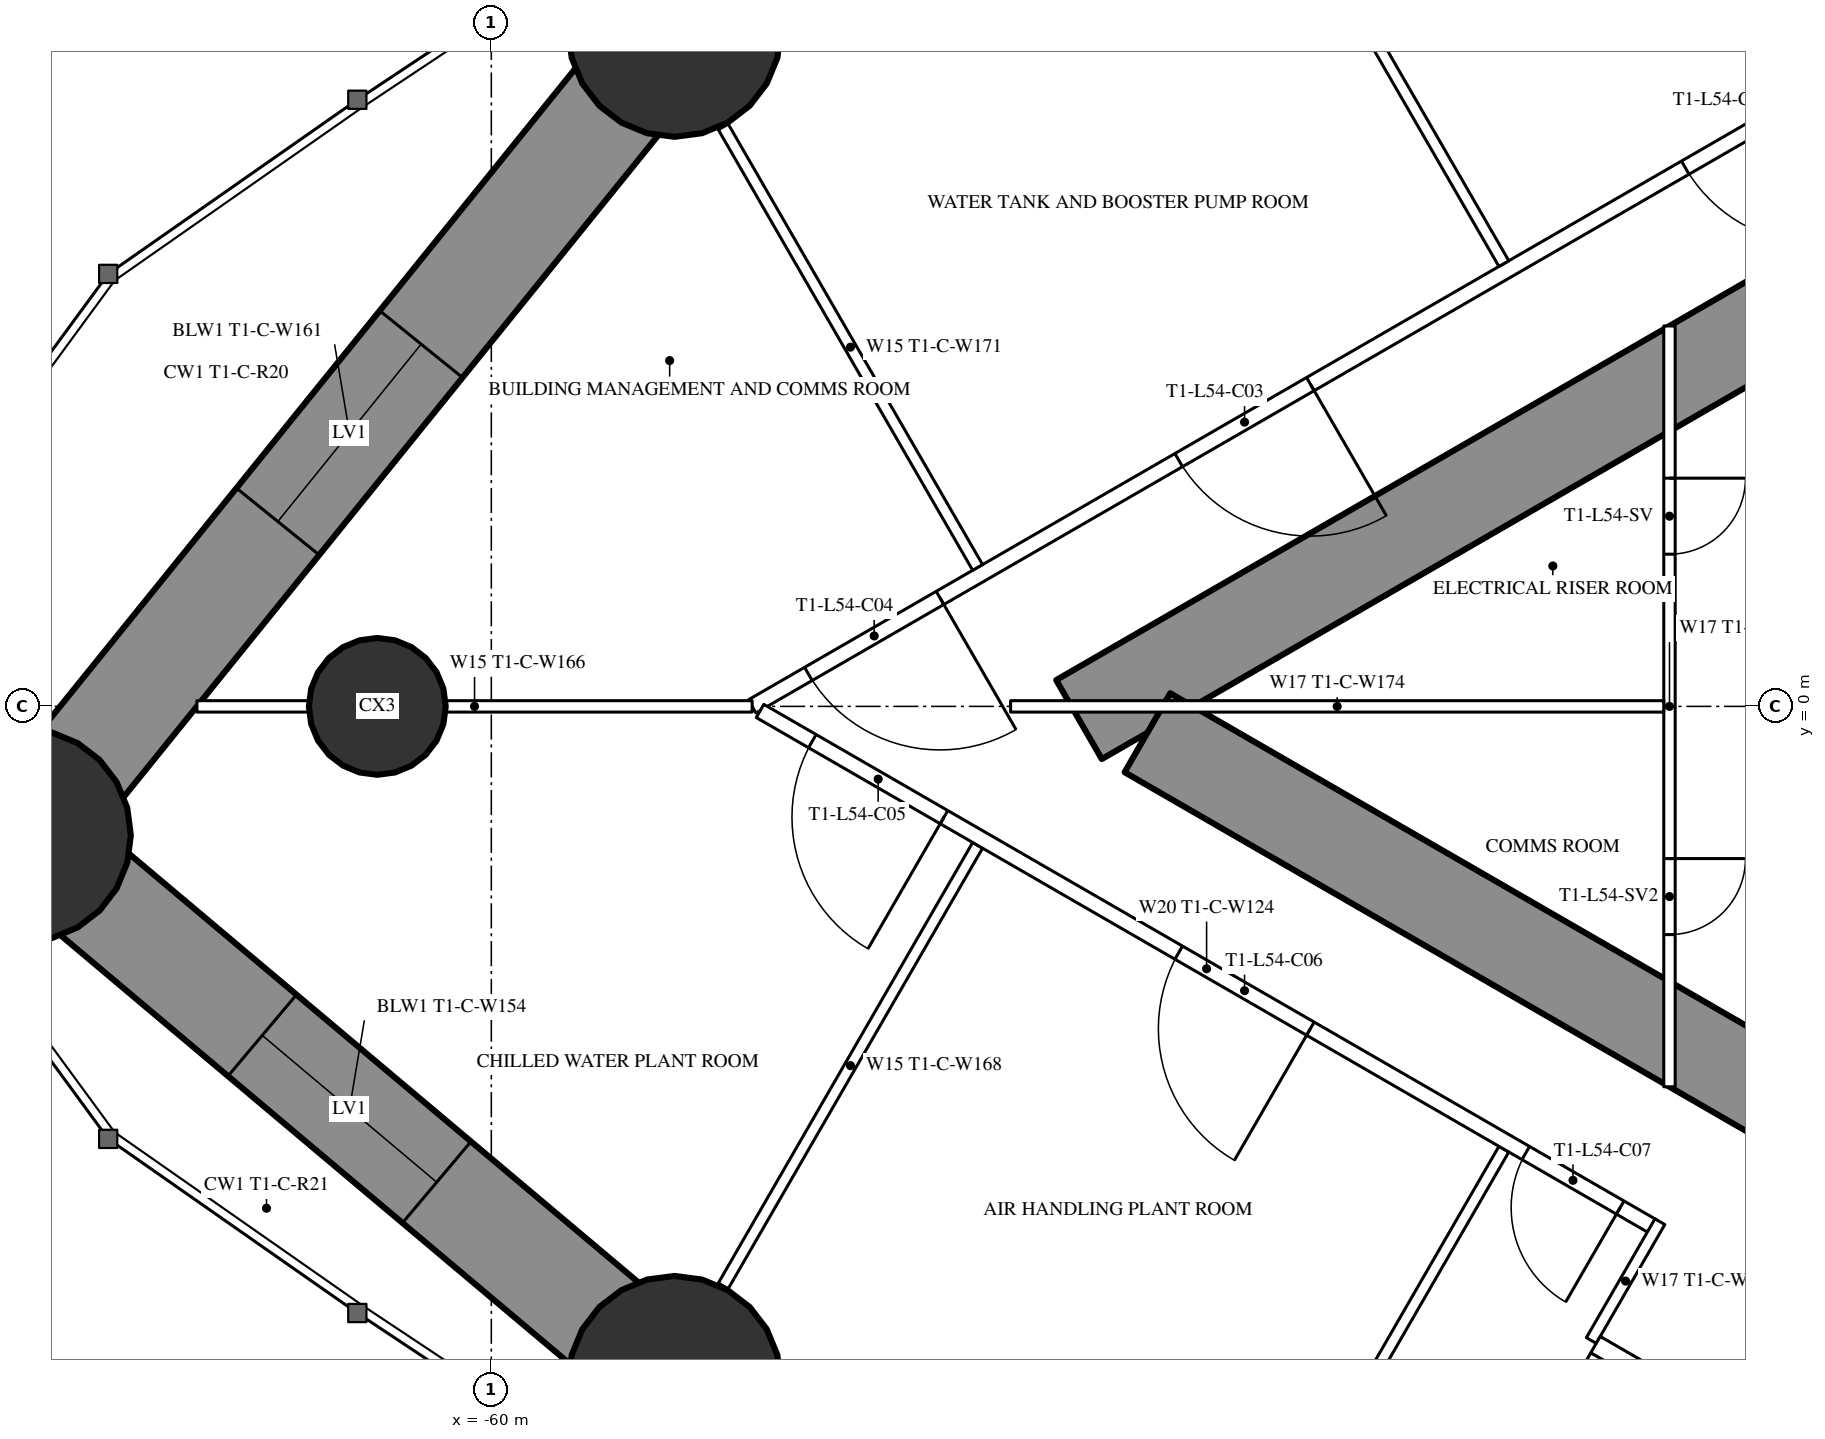
"""IFC4 building model, lengths in metres.
Left out: names, types, materials, properties, quantities, classifications, styles, units other than length and angle.
Written with IfcOpenShell. Run it as: python <this file> out.ifc"""

import sys

from ifc_helpers import new_model, si_unit, direction, frame, frame_2d, origin, origin_2d, place, context, subcontext, project, spatial, rectangle, circle, extrude, element, fill, save


model = new_model("IFC4")
c1 = context("Model", 3, precision=1e-05, world=origin(), true_north=direction((0.0, 1.0)))
c2 = subcontext(c1, "Body", "Model", "MODEL_VIEW")
j1 = project(units=[si_unit("LENGTHUNIT", "METRE"), si_unit("PLANEANGLEUNIT", "RADIAN")], contexts=[c1])
p1 = place(None, origin())
s1 = spatial("IfcSite", under=j1, at=p1, CompositionType="ELEMENT")
p2 = place(p1, origin())
s2 = spatial("IfcBuilding", under=s1, at=p2, CompositionType="ELEMENT")
p3 = place(p2, frame((0.0, 0.0, 201.8)))
s3 = spatial("IfcBuildingStorey", under=s2, at=p3, CompositionType="ELEMENT", Elevation=201.8)
for number, where, z_axis, x_axis in (
    (1, (-66.143, -1.695, 0.0), (0.0, 0.0, 1.0), (1.0, 0.0, 0.0)),
    (2, (-57.59, -8.893, 0.0), (0.0, 0.0, 1.0), (1.0, 0.0, 0.0)),
    (3, (-57.59, 8.893, 0.0), (0.0, 0.0, 1.0), (1.0, 0.0, 0.0)),
):
    element("IfcColumn", number, at=place(p3, frame(where, z_axis=z_axis, x_axis=x_axis)), inside=s3, PredefinedType="COLUMN", context=c2, shape_type="SweptSolid", body=[
        extrude(circle(Radius=1.4, at=origin_2d()), origin(), (0.0, 0.0, 1.0), 3.5),
    ])
p4 = place(p3, frame((-61.5, 0.0, 0.0), z_axis=(0.0, 0.0, 1.0), x_axis=(1.0, 0.0, 0.0)))
e4 = element("IfcColumn", 4, at=p4, inside=s3, PredefinedType="COLUMN", context=c2, shape_type="SweptSolid", body=[
    extrude(circle(Radius=0.9, at=origin_2d()), origin(), (0.0, 0.0, 1.0), 3.5),
])
p5 = place(p3, frame((-27.2, 14.3, 0.0), z_axis=(0.0, 0.0, 1.0), x_axis=(-0.866026593062, -0.499997940104, 0.0)))
e5 = element("IfcWall", 5, at=p5, inside=s3, PredefinedType="SHEAR", context=c2, shape_type="SweptSolid", body=[
    extrude(rectangle(XDim=28.946, YDim=1.2, at=frame_2d((14.473, 0.0))), origin(), (0.0, 0.0, 1.0), 3.5),
])
p6 = place(p5, frame((6.5, 0.0, 0.0)))
e6 = element("IfcOpeningElement", 6, at=p6, cuts=e5, PredefinedType="OPENING", context=c2, shape_type="SweptSolid", body=[
    extrude(rectangle(XDim=1.0, YDim=2.2, at=frame_2d((0.5, 1.1))), frame((0.0, 0.61, 0.0), z_axis=(0.0, -1.0, 0.0), x_axis=(1.0, 0.0, 0.0)), (0.0, 0.0, 1.0), 1.22),
])
p7 = place(p5, frame((13.395, 0.0, 0.0)))
e7 = element("IfcOpeningElement", 7, at=p7, cuts=e5, PredefinedType="OPENING", context=c2, shape_type="SweptSolid", body=[
    extrude(rectangle(XDim=1.8, YDim=2.03, at=frame_2d((0.9, 1.015))), frame((0.0, 0.61, 0.0), z_axis=(0.0, -1.0, 0.0), x_axis=(1.0, 0.0, 0.0)), (0.0, 0.0, 1.0), 1.22),
])
p8 = place(p3, frame((-27.2, -14.3, 0.0), z_axis=(0.0, 0.0, 1.0), x_axis=(-0.866024021859, 0.500002393557, 0.0)))
e8 = element("IfcWall", 8, at=p8, inside=s3, PredefinedType="SHEAR", context=c2, shape_type="SweptSolid", body=[
    extrude(rectangle(XDim=27.907, YDim=1.2, at=frame_2d((13.954, 0.0))), origin(), (0.0, 0.0, 1.0), 3.5),
])
p9 = place(p8, frame((6.5, 0.0, 0.0)))
e9 = element("IfcOpeningElement", 9, at=p9, cuts=e8, PredefinedType="OPENING", context=c2, shape_type="SweptSolid", body=[
    extrude(rectangle(XDim=1.0, YDim=2.2, at=frame_2d((0.5, 1.1))), frame((0.0, 0.61, 0.0), z_axis=(0.0, -1.0, 0.0), x_axis=(1.0, 0.0, 0.0)), (0.0, 0.0, 1.0), 1.22),
])
p10 = place(p8, frame((13.829, 0.0, 0.0)))
e10 = element("IfcOpeningElement", 10, at=p10, cuts=e8, PredefinedType="OPENING", context=c2, shape_type="SweptSolid", body=[
    extrude(rectangle(XDim=1.8, YDim=2.2, at=frame_2d((0.9, 1.1))), frame((0.0, 0.61, 0.0), z_axis=(0.0, -1.0, 0.0), x_axis=(1.0, 0.0, 0.0)), (0.0, 0.0, 1.0), 1.22),
])
p11 = place(p3, frame((-50.839, 13.043, 0.0), z_axis=(0.0, 0.0, 1.0), x_axis=(-0.851892008043, -0.523717487423, 0.0)))
e11 = element("IfcWall", 11, at=p11, inside=s3, PredefinedType="SHEAR", context=c2, shape_type="SweptSolid", body=[
    extrude(rectangle(XDim=7.924, YDim=1.4, at=frame_2d((3.962, 0.0))), origin(), (0.0, 0.0, 1.0), 3.5),
])
p12 = place(p11, frame((2.462, 0.0, 0.6)))
e12 = element("IfcOpeningElement", 12, at=p12, cuts=e11, PredefinedType="OPENING", context=c2, shape_type="SweptSolid", body=[
    extrude(rectangle(XDim=3.0, YDim=1.2, at=frame_2d((1.5, 0.6))), frame((0.0, 0.71, 0.0), z_axis=(0.0, -1.0, 0.0), x_axis=(1.0, 0.0, 0.0)), (0.0, 0.0, 1.0), 1.42),
])
p13 = place(p3, frame((-57.59, 8.893, 0.0), z_axis=(0.0, 0.0, 1.0), x_axis=(-0.628373846765, -0.777911504416, 0.0)))
e13 = element("IfcWall", 13, at=p13, inside=s3, PredefinedType="SHEAR", context=c2, shape_type="SweptSolid", body=[
    extrude(rectangle(XDim=13.611, YDim=1.4, at=frame_2d((6.806, 0.0))), origin(), (0.0, 0.0, 1.0), 3.5),
])
p14 = place(p13, frame((5.306, 0.0, 0.6)))
e14 = element("IfcOpeningElement", 14, at=p14, cuts=e13, PredefinedType="OPENING", context=c2, shape_type="SweptSolid", body=[
    extrude(rectangle(XDim=3.0, YDim=1.2, at=frame_2d((1.5, 0.6))), frame((0.0, 0.71, 0.0), z_axis=(0.0, -1.0, 0.0), x_axis=(1.0, 0.0, 0.0)), (0.0, 0.0, 1.0), 1.42),
])
p15 = place(p3, frame((-66.143, -1.695, 0.0), z_axis=(0.0, 0.0, 1.0), x_axis=(0.765120708367, -0.64388687021, 0.0)))
e15 = element("IfcWall", 15, at=p15, inside=s3, PredefinedType="SHEAR", context=c2, shape_type="SweptSolid", body=[
    extrude(rectangle(XDim=11.179, YDim=1.4, at=frame_2d((5.589, 0.0))), origin(), (0.0, 0.0, 1.0), 3.5),
])
p16 = place(p15, frame((4.089, 0.0, 0.6)))
e16 = element("IfcOpeningElement", 16, at=p16, cuts=e15, PredefinedType="OPENING", context=c2, shape_type="SweptSolid", body=[
    extrude(rectangle(XDim=3.0, YDim=1.2, at=frame_2d((1.5, 0.6))), frame((0.0, 0.71, 0.0), z_axis=(0.0, -1.0, 0.0), x_axis=(1.0, 0.0, 0.0)), (0.0, 0.0, 1.0), 1.42),
])
p17 = place(p3, frame((-57.59, -8.893, 0.0), z_axis=(0.0, 0.0, 1.0), x_axis=(0.851892008043, -0.523717487423, 0.0)))
e17 = element("IfcWall", 17, at=p17, inside=s3, PredefinedType="SHEAR", context=c2, shape_type="SweptSolid", body=[
    extrude(rectangle(XDim=7.924, YDim=1.4, at=frame_2d((3.962, 0.0))), origin(), (0.0, 0.0, 1.0), 3.5),
])
p18 = place(p17, frame((2.462, 0.0, 0.6)))
e18 = element("IfcOpeningElement", 18, at=p18, cuts=e17, PredefinedType="OPENING", context=c2, shape_type="SweptSolid", body=[
    extrude(rectangle(XDim=3.0, YDim=1.2, at=frame_2d((1.5, 0.6))), frame((0.0, 0.71, 0.0), z_axis=(0.0, -1.0, 0.0), x_axis=(1.0, 0.0, 0.0)), (0.0, 0.0, 1.0), 1.42),
])
p19 = place(p3, frame((-27.803, 16.608, 0.0), z_axis=(0.0, 0.0, 1.0), x_axis=(-0.866025851808, -0.499999223999, 0.0)))
e19 = element("IfcWall", 19, at=p19, inside=s3, PredefinedType="PARTITIONING", context=c2, shape_type="SweptSolid", body=[
    extrude(rectangle(XDim=33.215, YDim=0.2, at=frame_2d((16.608, 0.0))), origin(), (0.0, 0.0, 1.0), 3.25),
])
p20 = place(p19, frame((5.584, 0.0, 0.0)))
e20 = element("IfcOpeningElement", 20, at=p20, cuts=e19, PredefinedType="OPENING", context=c2, shape_type="SweptSolid", body=[
    extrude(rectangle(XDim=2.0, YDim=2.4, at=frame_2d((1.0, 1.2))), frame((0.0, 0.11, 0.0), z_axis=(0.0, -1.0, 0.0), x_axis=(1.0, 0.0, 0.0)), (0.0, 0.0, 1.0), 0.22),
])
p21 = place(p19, frame((17.04, 0.0, 0.0)))
e21 = element("IfcOpeningElement", 21, at=p21, cuts=e19, PredefinedType="OPENING", context=c2, shape_type="SweptSolid", body=[
    extrude(rectangle(XDim=2.0, YDim=2.4, at=frame_2d((1.0, 1.2))), frame((0.0, 0.11, 0.0), z_axis=(0.0, -1.0, 0.0), x_axis=(1.0, 0.0, 0.0)), (0.0, 0.0, 1.0), 0.22),
])
p22 = place(p19, frame((24.735, 0.0, 0.0)))
e22 = element("IfcOpeningElement", 22, at=p22, cuts=e19, PredefinedType="OPENING", context=c2, shape_type="SweptSolid", body=[
    extrude(rectangle(XDim=2.0, YDim=2.4, at=frame_2d((1.0, 1.2))), frame((0.0, 0.11, 0.0), z_axis=(0.0, -1.0, 0.0), x_axis=(1.0, 0.0, 0.0)), (0.0, 0.0, 1.0), 0.22),
])
p23 = place(p19, frame((30.361, 0.0, 0.0)))
e23 = element("IfcOpeningElement", 23, at=p23, cuts=e19, PredefinedType="OPENING", context=c2, shape_type="SweptSolid", body=[
    extrude(rectangle(XDim=2.0, YDim=2.03, at=frame_2d((1.0, 1.015))), frame((0.0, 0.11, 0.0), z_axis=(0.0, -1.0, 0.0), x_axis=(1.0, 0.0, 0.0)), (0.0, 0.0, 1.0), 0.22),
])
p24 = place(p3, frame((-46.679, 5.825, 0.0), z_axis=(0.0, 0.0, 1.0), x_axis=(-0.500006839597, 0.866021454905, 0.0)))
e24 = element("IfcWall", 24, at=p24, inside=s3, PredefinedType="PARTITIONING", context=c2, shape_type="SweptSolid", body=[
    extrude(rectangle(XDim=6.911, YDim=0.15, at=frame_2d((3.456, 0.0))), origin(), (0.0, 0.0, 1.0), 2.05),
])
p25 = place(p3, frame((-53.602, 1.828, 0.0), z_axis=(0.0, 0.0, 1.0), x_axis=(-0.49999191814, 0.866030069798, 0.0)))
e25 = element("IfcWall", 25, at=p25, inside=s3, PredefinedType="PARTITIONING", context=c2, shape_type="SweptSolid", body=[
    extrude(rectangle(XDim=6.692, YDim=0.15, at=frame_2d((3.346, 0.0))), origin(), (0.0, 0.0, 1.0), 2.05),
])
p26 = place(p3, frame((-46.679, -5.825, 0.0), z_axis=(0.0, 0.0, 1.0), x_axis=(-0.500006839597, -0.866021454905, 0.0)))
e26 = element("IfcWall", 26, at=p26, inside=s3, PredefinedType="PARTITIONING", context=c2, shape_type="SweptSolid", body=[
    extrude(rectangle(XDim=6.911, YDim=0.15, at=frame_2d((3.456, 0.0))), origin(), (0.0, 0.0, 1.0), 2.05),
])
p27 = place(p3, frame((-53.602, -1.828, 0.0), z_axis=(0.0, 0.0, 1.0), x_axis=(-0.49999191814, -0.866030069798, 0.0)))
e27 = element("IfcWall", 27, at=p27, inside=s3, PredefinedType="PARTITIONING", context=c2, shape_type="SweptSolid", body=[
    extrude(rectangle(XDim=6.692, YDim=0.15, at=frame_2d((3.346, 0.0))), origin(), (0.0, 0.0, 1.0), 2.05),
])
p28 = place(p3, frame((-56.568, 0.0, 0.0), z_axis=(0.0, 0.0, 1.0), x_axis=(-1.0, 0.0, 0.0)))
e28 = element("IfcWall", 28, at=p28, inside=s3, PredefinedType="PARTITIONING", context=c2, shape_type="SweptSolid", body=[
    extrude(rectangle(XDim=7.305, YDim=0.15, at=frame_2d((3.652, 0.0))), origin(), (0.0, 0.0, 1.0), 2.05),
])
p29 = place(p3, frame((-44.715, -6.844, 0.0), z_axis=(0.0, 0.0, 1.0), x_axis=(-0.866025261224, 0.500000246922, 0.0)))
e29 = element("IfcWall", 29, at=p29, inside=s3, PredefinedType="PARTITIONING", context=c2, shape_type="SweptSolid", body=[
    extrude(rectangle(XDim=13.567, YDim=0.2, at=frame_2d((6.783, 0.0))), origin(), (0.0, 0.0, 1.0), 3.25),
])
p30 = place(p29, frame((10.773, 0.0, 0.0)))
e30 = element("IfcOpeningElement", 30, at=p30, cuts=e29, PredefinedType="OPENING", context=c2, shape_type="SweptSolid", body=[
    extrude(rectangle(XDim=2.0, YDim=2.03, at=frame_2d((1.0, 1.015))), frame((0.0, 0.11, 0.0), z_axis=(0.0, -1.0, 0.0), x_axis=(1.0, 0.0, 0.0)), (0.0, 0.0, 1.0), 0.22),
])
p31 = place(p29, frame((5.207, 0.0, 0.0)))
e31 = element("IfcOpeningElement", 31, at=p31, cuts=e29, PredefinedType="OPENING", context=c2, shape_type="SweptSolid", body=[
    extrude(rectangle(XDim=2.0, YDim=2.4, at=frame_2d((1.0, 1.2))), frame((0.0, 0.11, 0.0), z_axis=(0.0, -1.0, 0.0), x_axis=(1.0, 0.0, 0.0)), (0.0, 0.0, 1.0), 0.22),
])
p32 = place(p29, frame((0.5, 0.0, 0.0)))
e32 = element("IfcOpeningElement", 32, at=p32, cuts=e29, PredefinedType="OPENING", context=c2, shape_type="SweptSolid", body=[
    extrude(rectangle(XDim=1.435, YDim=2.03, at=frame_2d((0.718, 1.015))), frame((0.0, 0.11, 0.0), z_axis=(0.0, -1.0, 0.0), x_axis=(1.0, 0.0, 0.0)), (0.0, 0.0, 1.0), 0.22),
])
p33 = place(p3, frame((-44.626, -6.779, 0.0), z_axis=(0.0, 0.0, 1.0), x_axis=(-0.500022947832, -0.866012154442, 0.0)))
e33 = element("IfcWall", 33, at=p33, inside=s3, PredefinedType="PARTITIONING", context=c2, shape_type="SweptSolid", body=[
    extrude(rectangle(XDim=1.805, YDim=0.15, at=frame_2d((0.903, 0.0))), origin(), (0.0, 0.0, 1.0), 3.25),
])
p34 = place(p3, frame((-44.5, 5.005, 0.0), z_axis=(0.0, 0.0, 1.0), x_axis=(0.0, -1.0, 0.0)))
e34 = element("IfcWall", 34, at=p34, inside=s3, PredefinedType="PARTITIONING", context=c2, shape_type="SweptSolid", body=[
    extrude(rectangle(XDim=10.009, YDim=0.15, at=frame_2d((5.005, 0.0))), origin(), (0.0, 0.0, 1.0), 3.25),
])
p35 = place(p34, frame((2.002, 0.0, 0.0)))
e35 = element("IfcOpeningElement", 35, at=p35, cuts=e34, PredefinedType="OPENING", context=c2, shape_type="SweptSolid", body=[
    extrude(rectangle(XDim=1.0, YDim=2.2, at=frame_2d((0.5, 1.1))), frame((0.0, 0.085, 0.0), z_axis=(0.0, -1.0, 0.0), x_axis=(1.0, 0.0, 0.0)), (0.0, 0.0, 1.0), 0.17),
])
p36 = place(p34, frame((7.007, 0.0, 0.0)))
e36 = element("IfcOpeningElement", 36, at=p36, cuts=e34, PredefinedType="OPENING", context=c2, shape_type="SweptSolid", body=[
    extrude(rectangle(XDim=1.0, YDim=2.2, at=frame_2d((0.5, 1.1))), frame((0.0, 0.085, 0.0), z_axis=(0.0, -1.0, 0.0), x_axis=(1.0, 0.0, 0.0)), (0.0, 0.0, 1.0), 0.17),
])
p37 = place(p3, frame((-44.575, 0.0, 0.0), z_axis=(0.0, 0.0, 1.0), x_axis=(-1.0, 0.0, 0.0)))
e37 = element("IfcWall", 37, at=p37, inside=s3, PredefinedType="PARTITIONING", context=c2, shape_type="SweptSolid", body=[
    extrude(rectangle(XDim=8.593, YDim=0.15, at=frame_2d((4.297, 0.0))), origin(), (0.0, 0.0, 1.0), 2.05),
])
p38 = place(p3, frame((-39.758, -11.697, 0.0), z_axis=(0.0, 0.0, 1.0), x_axis=(-0.866024194504, 0.500002094529, 0.0)))
e38 = element("IfcWall", 38, at=p38, inside=s3, PredefinedType="PARTITIONING", context=c2, shape_type="SweptSolid", body=[
    extrude(rectangle(XDim=6.6, YDim=0.25, at=frame_2d((3.3, 0.0))), origin(), (0.0, 0.0, 1.0), 3.25),
])
p39 = place(p3, frame((-45.428, -8.568, 0.0), z_axis=(0.0, 0.0, 1.0), x_axis=(-0.499929347863, -0.866066190972, 0.0)))
e39 = element("IfcWall", 39, at=p39, inside=s3, PredefinedType="PARTITIONING", context=c2, shape_type="SweptSolid", body=[
    extrude(rectangle(XDim=3.201, YDim=0.25, at=frame_2d((1.6, 0.0))), origin(), (0.0, 0.0, 1.0), 3.25),
])
p40 = place(p14, origin())
e40 = element("IfcWindow", 40, at=p40, inside=s3, PartitioningType="SINGLE_PANEL", PredefinedType="WINDOW", context=c2, shape_type="SweptSolid", body=[
    extrude(rectangle(XDim=3.0, YDim=1.2, at=frame_2d((1.5, 0.6))), frame((0.0, 0.03, 0.0), z_axis=(0.0, -1.0, 0.0), x_axis=(1.0, 0.0, 0.0)), (0.0, 0.0, 1.0), 0.06),
])
fill(e14, e40)
p41 = place(p16, origin())
e41 = element("IfcWindow", 41, at=p41, inside=s3, PartitioningType="SINGLE_PANEL", PredefinedType="WINDOW", context=c2, shape_type="SweptSolid", body=[
    extrude(rectangle(XDim=3.0, YDim=1.2, at=frame_2d((1.5, 0.6))), frame((0.0, 0.03, 0.0), z_axis=(0.0, -1.0, 0.0), x_axis=(1.0, 0.0, 0.0)), (0.0, 0.0, 1.0), 0.06),
])
fill(e16, e41)
p42 = place(p21, origin())
e42 = element("IfcDoor", 42, at=p42, inside=s3, OperationType="DOUBLE_DOOR_SINGLE_SWING", PredefinedType="DOOR", context=c2, shape_type="SweptSolid", body=[
    extrude(rectangle(XDim=2.0, YDim=2.4, at=frame_2d((1.0, 1.2))), frame((0.0, 0.025, 0.0), z_axis=(0.0, -1.0, 0.0), x_axis=(1.0, 0.0, 0.0)), (0.0, 0.0, 1.0), 0.05),
])
fill(e21, e42)
p43 = place(p22, origin())
e43 = element("IfcDoor", 43, at=p43, inside=s3, OperationType="DOUBLE_DOOR_SINGLE_SWING", PredefinedType="DOOR", context=c2, shape_type="SweptSolid", body=[
    extrude(rectangle(XDim=2.0, YDim=2.4, at=frame_2d((1.0, 1.2))), frame((0.0, 0.025, 0.0), z_axis=(0.0, -1.0, 0.0), x_axis=(1.0, 0.0, 0.0)), (0.0, 0.0, 1.0), 0.05),
])
fill(e22, e43)
p44 = place(p23, origin())
e44 = element("IfcDoor", 44, at=p44, inside=s3, OperationType="DOUBLE_DOOR_SINGLE_SWING", PredefinedType="DOOR", context=c2, shape_type="SweptSolid", body=[
    extrude(rectangle(XDim=2.0, YDim=2.03, at=frame_2d((1.0, 1.015))), frame((0.0, 0.025, 0.0), z_axis=(0.0, -1.0, 0.0), x_axis=(1.0, 0.0, 0.0)), (0.0, 0.0, 1.0), 0.05),
])
fill(e23, e44)
p45 = place(p30, origin())
e45 = element("IfcDoor", 45, at=p45, inside=s3, OperationType="DOUBLE_DOOR_SINGLE_SWING", PredefinedType="DOOR", context=c2, shape_type="SweptSolid", body=[
    extrude(rectangle(XDim=2.0, YDim=2.03, at=frame_2d((1.0, 1.015))), frame((0.0, 0.025, 0.0), z_axis=(0.0, -1.0, 0.0), x_axis=(1.0, 0.0, 0.0)), (0.0, 0.0, 1.0), 0.05),
])
fill(e30, e45)
p46 = place(p31, origin())
e46 = element("IfcDoor", 46, at=p46, inside=s3, OperationType="DOUBLE_DOOR_SINGLE_SWING", PredefinedType="DOOR", context=c2, shape_type="SweptSolid", body=[
    extrude(rectangle(XDim=2.0, YDim=2.4, at=frame_2d((1.0, 1.2))), frame((0.0, 0.025, 0.0), z_axis=(0.0, -1.0, 0.0), x_axis=(1.0, 0.0, 0.0)), (0.0, 0.0, 1.0), 0.05),
])
fill(e31, e46)
p47 = place(p32, origin())
e47 = element("IfcDoor", 47, at=p47, inside=s3, OperationType="SINGLE_SWING_LEFT", PredefinedType="DOOR", context=c2, shape_type="SweptSolid", body=[
    extrude(rectangle(XDim=1.435, YDim=2.03, at=frame_2d((0.718, 1.015))), frame((0.0, 0.025, 0.0), z_axis=(0.0, -1.0, 0.0), x_axis=(1.0, 0.0, 0.0)), (0.0, 0.0, 1.0), 0.05),
])
fill(e32, e47)
p48 = place(p35, origin())
e48 = element("IfcDoor", 48, at=p48, inside=s3, OperationType="SINGLE_SWING_LEFT", PredefinedType="DOOR", context=c2, shape_type="SweptSolid", body=[
    extrude(rectangle(XDim=1.0, YDim=2.2, at=frame_2d((0.5, 1.1))), frame((0.0, 0.025, 0.0), z_axis=(0.0, -1.0, 0.0), x_axis=(1.0, 0.0, 0.0)), (0.0, 0.0, 1.0), 0.05),
])
fill(e35, e48)
p49 = place(p36, origin())
e49 = element("IfcDoor", 49, at=p49, inside=s3, OperationType="SINGLE_SWING_LEFT", PredefinedType="DOOR", context=c2, shape_type="SweptSolid", body=[
    extrude(rectangle(XDim=1.0, YDim=2.2, at=frame_2d((0.5, 1.1))), frame((0.0, 0.025, 0.0), z_axis=(0.0, -1.0, 0.0), x_axis=(1.0, 0.0, 0.0)), (0.0, 0.0, 1.0), 0.05),
])
fill(e36, e49)
save(model, sys.argv[1])
